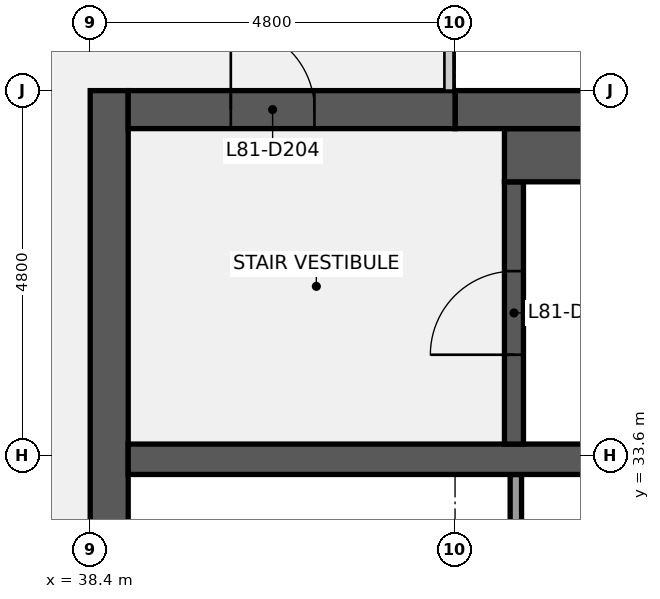
"""IFC4 building model, lengths in metres.
Left out: names, types, materials, properties, quantities, classifications, styles, units other than length and angle.
Written with IfcOpenShell. Run it as: python <this file> out.ifc"""

import sys

from ifc_helpers import new_model, si_unit, direction, frame, frame_2d, origin, place, context, subcontext, project, spatial, rectangle, extrude, element, fill, save


model = new_model("IFC4")
c1 = context("Model", 3, precision=1e-05, world=origin(), true_north=direction((0.0, 1.0)))
c2 = subcontext(c1, "Body", "Model", "MODEL_VIEW")
j1 = project(units=[si_unit("LENGTHUNIT", "METRE"), si_unit("PLANEANGLEUNIT", "RADIAN")], contexts=[c1])
p1 = place(None, origin())
s1 = spatial("IfcSite", under=j1, at=p1, CompositionType="ELEMENT")
p2 = place(p1, origin())
s2 = spatial("IfcBuilding", under=s1, at=p2, CompositionType="ELEMENT")
p3 = place(p2, frame((0.0, 0.0, 362.3)))
s3 = spatial("IfcBuildingStorey", under=s2, at=p3, CompositionType="ELEMENT", Elevation=362.3)
p4 = place(p3, frame((38.65, 9.6, 0.0), z_axis=(0.0, 0.0, 1.0), x_axis=(0.0, 1.0, 0.0)))
e1 = element("IfcWall", 1, at=p4, inside=s3, PredefinedType="SHEAR", context=c2, shape_type="SweptSolid", body=[
    extrude(rectangle(XDim=28.8, YDim=0.5, at=frame_2d((14.4, 0.0))), origin(), (0.0, 0.0, 1.0), 3.75),
])
p5 = place(p4, frame((8.7, 0.0, 0.0)))
e2 = element("IfcOpeningElement", 2, at=p5, cuts=e1, PredefinedType="OPENING", context=c2, shape_type="SweptSolid", body=[
    extrude(rectangle(XDim=1.8, YDim=2.1, at=frame_2d((0.9, 1.05))), frame((0.0, 0.26, 0.0), z_axis=(0.0, -1.0, 0.0), x_axis=(1.0, 0.0, 0.0)), (0.0, 0.0, 1.0), 0.52),
])
p6 = place(p4, frame((18.3, 0.0, 0.0)))
e3 = element("IfcOpeningElement", 3, at=p6, cuts=e1, PredefinedType="OPENING", context=c2, shape_type="SweptSolid", body=[
    extrude(rectangle(XDim=1.8, YDim=2.1, at=frame_2d((0.9, 1.05))), frame((0.0, 0.26, 0.0), z_axis=(0.0, -1.0, 0.0), x_axis=(1.0, 0.0, 0.0)), (0.0, 0.0, 1.0), 0.52),
])
p7 = place(p3, frame((44.0, 30.75, 0.0), z_axis=(0.0, 0.0, 1.0), x_axis=(0.0, 1.0, 0.0)))
e4 = element("IfcWall", 4, at=p7, inside=s3, PredefinedType="PARTITIONING", context=c2, shape_type="SweptSolid", body=[
    extrude(rectangle(XDim=2.6, YDim=0.15, at=frame_2d((1.3, 0.0))), origin(), (0.0, 0.0, 1.0), 3.75),
])
p8 = place(p3, frame((38.9, 33.55, 0.0), z_axis=(0.0, 0.0, 1.0), x_axis=(1.0, 0.0, 0.0)))
e5 = element("IfcWall", 5, at=p8, inside=s3, PredefinedType="SHEAR", context=c2, shape_type="SweptSolid", body=[
    extrude(rectangle(XDim=18.2, YDim=0.4, at=frame_2d((9.1, 0.0))), origin(), (0.0, 0.0, 1.0), 3.75),
])
p9 = place(p3, frame((43.975, 33.75, 0.0), z_axis=(0.0, 0.0, 1.0), x_axis=(0.0, 1.0, 0.0)))
e6 = element("IfcWall", 6, at=p9, inside=s3, PredefinedType="SHEAR", context=c2, shape_type="SweptSolid", body=[
    extrude(rectangle(XDim=3.45, YDim=0.25, at=frame_2d((1.725, 0.0))), origin(), (0.0, 0.0, 1.0), 3.75),
])
p10 = place(p9, frame((1.175, 0.0, 0.0)))
e7 = element("IfcOpeningElement", 7, at=p10, cuts=e6, PredefinedType="OPENING", context=c2, shape_type="SweptSolid", body=[
    extrude(rectangle(XDim=1.1, YDim=2.1, at=frame_2d((0.55, 1.05))), frame((0.0, 0.135, 0.0), z_axis=(0.0, -1.0, 0.0), x_axis=(1.0, 0.0, 0.0)), (0.0, 0.0, 1.0), 0.27),
])
p11 = place(p3, frame((43.85, 37.55, 0.0), z_axis=(0.0, 0.0, 1.0), x_axis=(1.0, 0.0, 0.0)))
e8 = element("IfcWall", 8, at=p11, inside=s3, PredefinedType="SHEAR", context=c2, shape_type="SweptSolid", body=[
    extrude(rectangle(XDim=7.5, YDim=0.7, at=frame_2d((3.75, 0.0))), origin(), (0.0, 0.0, 1.0), 3.75),
])
p12 = place(p3, frame((43.2, 38.15, 0.0), z_axis=(0.0, 0.0, 1.0), x_axis=(1.0, 0.0, 0.0)))
e9 = element("IfcWall", 9, at=p12, inside=s3, PredefinedType="SHEAR", context=c2, shape_type="SweptSolid", body=[
    extrude(rectangle(XDim=13.9, YDim=0.5, at=frame_2d((6.95, 0.0))), origin(), (0.0, 0.0, 1.0), 3.75),
])
p13 = place(p3, frame((38.9, 38.15, 0.0), z_axis=(0.0, 0.0, 1.0), x_axis=(1.0, 0.0, 0.0)))
e10 = element("IfcWall", 10, at=p13, inside=s3, PredefinedType="SHEAR", context=c2, shape_type="SweptSolid", body=[
    extrude(rectangle(XDim=4.3, YDim=0.5, at=frame_2d((2.15, 0.0))), origin(), (0.0, 0.0, 1.0), 3.75),
])
p14 = place(p13, frame((1.35, 0.0, 0.0)))
e11 = element("IfcOpeningElement", 11, at=p14, cuts=e10, PredefinedType="OPENING", context=c2, shape_type="SweptSolid", body=[
    extrude(rectangle(XDim=1.1, YDim=2.1, at=frame_2d((0.55, 1.05))), frame((0.0, 0.26, 0.0), z_axis=(0.0, -1.0, 0.0), x_axis=(1.0, 0.0, 0.0)), (0.0, 0.0, 1.0), 0.52),
])
p15 = place(p10, origin())
e12 = element("IfcDoor", 12, at=p15, inside=s3, OperationType="SINGLE_SWING_LEFT", PredefinedType="DOOR", context=c2, shape_type="SweptSolid", body=[
    extrude(rectangle(XDim=1.1, YDim=2.1, at=frame_2d((0.55, 1.05))), frame((0.0, 0.025, 0.0), z_axis=(0.0, -1.0, 0.0), x_axis=(1.0, 0.0, 0.0)), (0.0, 0.0, 1.0), 0.05),
])
fill(e7, e12)
p16 = place(p14, origin())
e13 = element("IfcDoor", 13, at=p16, inside=s3, OperationType="SINGLE_SWING_LEFT", PredefinedType="DOOR", context=c2, shape_type="SweptSolid", body=[
    extrude(rectangle(XDim=1.1, YDim=2.1, at=frame_2d((0.55, 1.05))), frame((0.0, 0.025, 0.0), z_axis=(0.0, -1.0, 0.0), x_axis=(1.0, 0.0, 0.0)), (0.0, 0.0, 1.0), 0.05),
])
fill(e11, e13)
save(model, sys.argv[1])
